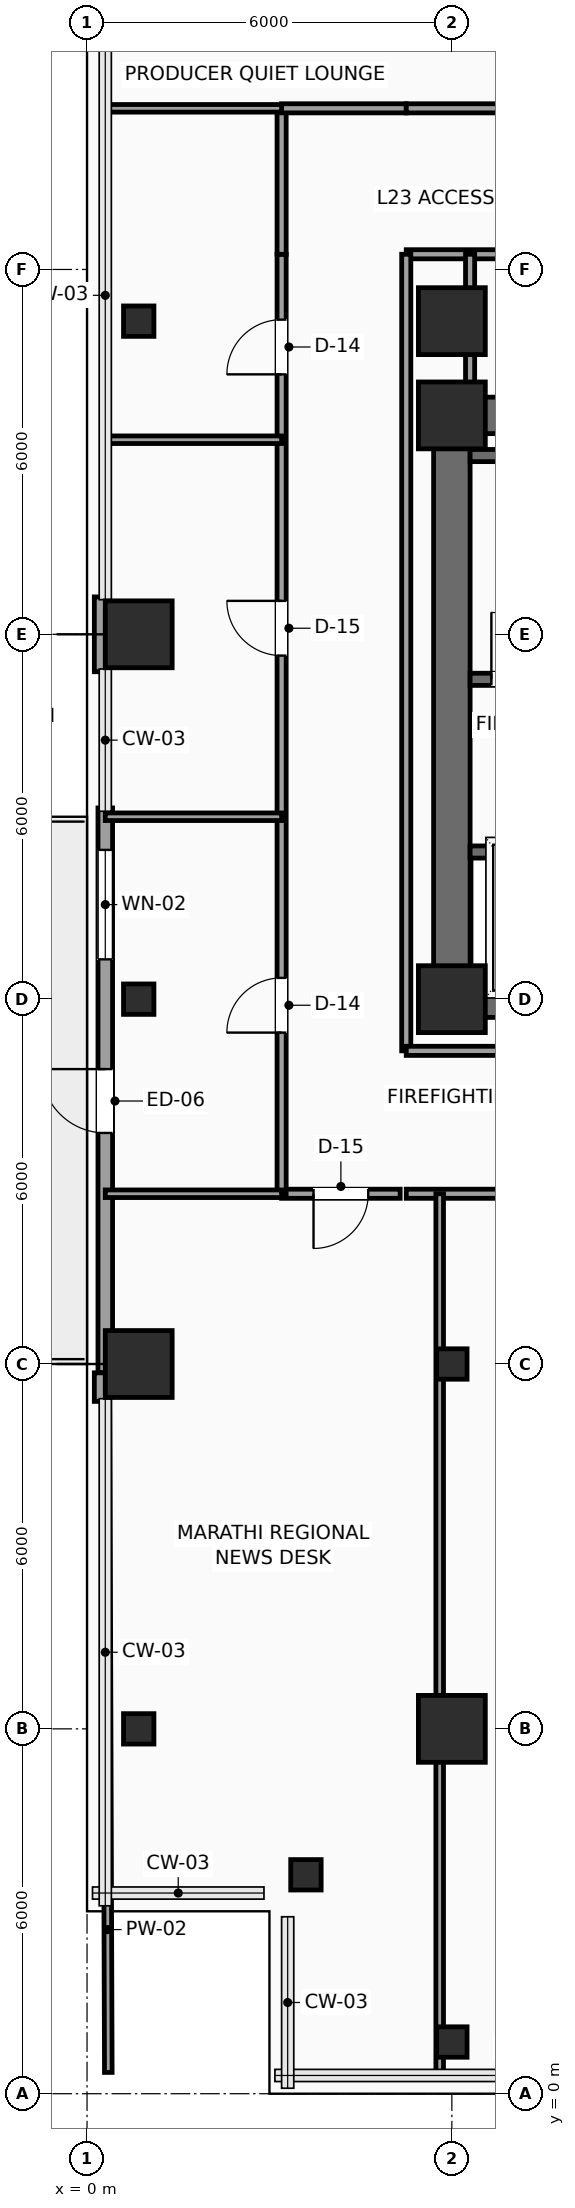
"""IFC4 building model, lengths in metres.
Left out: names, types, materials, properties, quantities, classifications, styles, units other than length and angle.
Written with IfcOpenShell. Run it as: python <this file> out.ifc"""

import sys

from ifc_helpers import new_model, si_unit, direction, frame, frame_2d, origin, origin_2d, place, context, subcontext, project, spatial, rectangle, hollow_rectangle, extrude, element, fill, save


model = new_model("IFC4")
c1 = context("Model", 3, precision=1e-05, world=origin(), true_north=direction((0.0, 1.0)))
c2 = subcontext(c1, "Body", "Model", "MODEL_VIEW")
j1 = project(units=[si_unit("LENGTHUNIT", "METRE"), si_unit("PLANEANGLEUNIT", "RADIAN")], contexts=[c1])
p1 = place(None, origin())
s1 = spatial("IfcSite", under=j1, at=p1, CompositionType="ELEMENT")
p2 = place(p1, origin())
s2 = spatial("IfcBuilding", under=s1, at=p2, CompositionType="ELEMENT")
p3 = place(p2, frame((0.0, 0.0, 99.6)))
s3 = spatial("IfcBuildingStorey", under=s2, at=p3, CompositionType="ELEMENT", Elevation=99.6)
for number, where, z_axis, x_axis in (
    (1, (6.0, 18.0, 0.0), (0.0, 0.0, 1.0), (1.0, 0.0, 0.0)),
    (2, (6.0, 27.6, 0.0), (0.0, 0.0, 1.0), (1.0, 0.0, 0.0)),
):
    element("IfcColumn", number, at=place(p3, frame(where, z_axis=z_axis, x_axis=x_axis)), inside=s3, PredefinedType="COLUMN", context=c2, shape_type="SweptSolid", body=[
        extrude(rectangle(XDim=1.1, YDim=1.1, at=origin_2d()), origin(), (0.0, 0.0, 1.0), 3.75),
    ])
for number, where, z_axis, x_axis in (
    (3, (3.6, 3.6, 0.0), (0.0, 0.0, 1.0), (1.0, 0.0, 0.0)),
    (4, (0.85, 6.0, 0.0), (0.0, 0.0, 1.0), (1.0, 0.0, 0.0)),
):
    element("IfcColumn", number, at=place(p3, frame(where, z_axis=z_axis, x_axis=x_axis)), inside=s3, PredefinedType="COLUMN", context=c2, shape_type="SweptSolid", body=[
        extrude(hollow_rectangle(XDim=0.5, YDim=0.5, WallThickness=0.025, InnerFilletRadius=0.025, OuterFilletRadius=0.04, at=origin_2d()), origin(), (0.0, 0.0, 1.0), 3.75),
    ])
p4 = place(p3, frame((0.85, 12.0, 0.0), z_axis=(0.0, 0.0, 1.0), x_axis=(1.0, 0.0, 0.0)))
e5 = element("IfcColumn", 5, at=p4, inside=s3, PredefinedType="COLUMN", context=c2, shape_type="SweptSolid", body=[
    extrude(rectangle(XDim=1.1, YDim=1.1, at=origin_2d()), origin(), (0.0, 0.0, 1.0), 3.75),
])
p5 = place(p3, frame((0.85, 18.0, 0.0), z_axis=(0.0, 0.0, 1.0), x_axis=(1.0, 0.0, 0.0)))
e6 = element("IfcColumn", 6, at=p5, inside=s3, PredefinedType="COLUMN", context=c2, shape_type="SweptSolid", body=[
    extrude(hollow_rectangle(XDim=0.5, YDim=0.5, WallThickness=0.025, InnerFilletRadius=0.025, OuterFilletRadius=0.04, at=origin_2d()), origin(), (0.0, 0.0, 1.0), 3.75),
])
p6 = place(p3, frame((0.85, 24.0, 0.0), z_axis=(0.0, 0.0, 1.0), x_axis=(1.0, 0.0, 0.0)))
e7 = element("IfcColumn", 7, at=p6, inside=s3, PredefinedType="COLUMN", context=c2, shape_type="SweptSolid", body=[
    extrude(rectangle(XDim=1.1, YDim=1.1, at=origin_2d()), origin(), (0.0, 0.0, 1.0), 3.75),
])
for number, where, z_axis, x_axis in (
    (8, (0.85, 29.15, 0.0), (0.0, 0.0, 1.0), (1.0, 0.0, 0.0)),
    (9, (6.0, 0.85, 0.0), (0.0, 0.0, 1.0), (1.0, 0.0, 0.0)),
):
    element("IfcColumn", number, at=place(p3, frame(where, z_axis=z_axis, x_axis=x_axis)), inside=s3, PredefinedType="COLUMN", context=c2, shape_type="SweptSolid", body=[
        extrude(hollow_rectangle(XDim=0.5, YDim=0.5, WallThickness=0.025, InnerFilletRadius=0.025, OuterFilletRadius=0.04, at=origin_2d()), origin(), (0.0, 0.0, 1.0), 3.75),
    ])
p7 = place(p3, frame((6.0, 6.0, 0.0), z_axis=(0.0, 0.0, 1.0), x_axis=(1.0, 0.0, 0.0)))
e10 = element("IfcColumn", 10, at=p7, inside=s3, PredefinedType="COLUMN", context=c2, shape_type="SweptSolid", body=[
    extrude(rectangle(XDim=1.1, YDim=1.1, at=origin_2d()), origin(), (0.0, 0.0, 1.0), 3.75),
])
p8 = place(p3, frame((6.0, 12.0, 0.0), z_axis=(0.0, 0.0, 1.0), x_axis=(1.0, 0.0, 0.0)))
e11 = element("IfcColumn", 11, at=p8, inside=s3, PredefinedType="COLUMN", context=c2, shape_type="SweptSolid", body=[
    extrude(hollow_rectangle(XDim=0.5, YDim=0.5, WallThickness=0.025, InnerFilletRadius=0.025, OuterFilletRadius=0.04, at=origin_2d()), origin(), (0.0, 0.0, 1.0), 3.75),
])
p9 = place(p3, frame((6.0, 29.15, 0.0), z_axis=(0.0, 0.0, 1.0), x_axis=(1.0, 0.0, 0.0)))
e12 = element("IfcColumn", 12, at=p9, inside=s3, PredefinedType="COLUMN", context=c2, shape_type="SweptSolid", body=[
    extrude(rectangle(XDim=1.1, YDim=1.1, at=origin_2d()), origin(), (0.0, 0.0, 1.0), 3.75),
])
p10 = place(p3, frame((0.3, 11.855, 0.0), z_axis=(0.0, 0.0, 1.0), x_axis=(0.0, 1.0, 0.0)))
e13 = element("IfcWall", 13, at=p10, inside=s3, PredefinedType="SOLIDWALL", context=c2, shape_type="SweptSolid", body=[
    extrude(rectangle(XDim=9.29, YDim=0.24, at=frame_2d((4.645, 0.0))), origin(), (0.0, 0.0, 1.0), 3.525),
])
p11 = place(p10, frame((3.945, 0.0, 0.0)))
e14 = element("IfcOpeningElement", 14, at=p11, cuts=e13, PredefinedType="OPENING", context=c2, shape_type="SweptSolid", body=[
    extrude(rectangle(XDim=1.05, YDim=2.2, at=frame_2d((0.525, 1.1))), frame((0.0, 0.13, 0.0), z_axis=(0.0, -1.0, 0.0), x_axis=(1.0, 0.0, 0.0)), (0.0, 0.0, 1.0), 0.26),
])
p12 = place(p10, frame((6.8, 0.0, 0.85)))
e15 = element("IfcOpeningElement", 15, at=p12, cuts=e13, PredefinedType="OPENING", context=c2, shape_type="SweptSolid", body=[
    extrude(rectangle(XDim=1.8, YDim=2.1, at=frame_2d((0.9, 1.05))), frame((0.0, 0.13, 0.0), z_axis=(0.0, -1.0, 0.0), x_axis=(1.0, 0.0, 0.0)), (0.0, 0.0, 1.0), 0.26),
])
p13 = place(p3, frame((0.24, 11.385, 0.0), z_axis=(0.0, 0.0, 1.0), x_axis=(0.0, 1.0, 0.0)))
e16 = element("IfcWall", 16, at=p13, inside=s3, PredefinedType="SOLIDWALL", context=c2, shape_type="SweptSolid", body=[
    extrude(rectangle(XDim=0.47, YDim=0.24, at=frame_2d((0.235, 0.0))), origin(), (0.0, 0.0, 1.0), 3.525),
])
p14 = place(p3, frame((0.24, 23.385, 0.0), z_axis=(0.0, 0.0, 1.0), x_axis=(0.0, 1.0, 0.0)))
e17 = element("IfcWall", 17, at=p14, inside=s3, PredefinedType="SOLIDWALL", context=c2, shape_type="SweptSolid", body=[
    extrude(rectangle(XDim=1.23, YDim=0.24, at=frame_2d((0.615, 0.0))), origin(), (0.0, 0.0, 1.0), 3.525),
])
p15 = place(p3, frame((6.0, 18.0, 0.0), z_axis=(0.0, 0.0, 1.0), x_axis=(1.0, 0.0, 0.0)))
e18 = element("IfcWall", 18, at=p15, inside=s3, PredefinedType="SHEAR", context=c2, shape_type="SweptSolid", body=[
    extrude(rectangle(XDim=12.0, YDim=0.6, at=frame_2d((6.0, 0.0))), origin(), (0.0, 0.0, 1.0), 3.525),
])
p16 = place(p15, frame((7.15, 0.0, 0.0)))
e19 = element("IfcOpeningElement", 19, at=p16, cuts=e18, PredefinedType="OPENING", context=c2, shape_type="SweptSolid", body=[
    extrude(rectangle(XDim=1.6, YDim=2.3, at=frame_2d((0.8, 1.15))), frame((0.0, 0.31, 0.0), z_axis=(0.0, -1.0, 0.0), x_axis=(1.0, 0.0, 0.0)), (0.0, 0.0, 1.0), 0.62),
])
p17 = place(p3, frame((6.0, 27.6, 0.0), z_axis=(0.0, 0.0, 1.0), x_axis=(1.0, 0.0, 0.0)))
e20 = element("IfcWall", 20, at=p17, inside=s3, PredefinedType="SHEAR", context=c2, shape_type="SweptSolid", body=[
    extrude(rectangle(XDim=12.0, YDim=0.6, at=frame_2d((6.0, 0.0))), origin(), (0.0, 0.0, 1.0), 3.525),
])
p18 = place(p17, frame((10.2, 0.0, 0.0)))
e21 = element("IfcOpeningElement", 21, at=p18, cuts=e20, PredefinedType="OPENING", context=c2, shape_type="SweptSolid", body=[
    extrude(rectangle(XDim=0.9, YDim=2.15, at=frame_2d((0.45, 1.075))), frame((0.0, 0.31, 0.0), z_axis=(0.0, -1.0, 0.0), x_axis=(1.0, 0.0, 0.0)), (0.0, 0.0, 1.0), 0.62),
])
p19 = place(p3, frame((6.0, 18.0, 0.0), z_axis=(0.0, 0.0, 1.0), x_axis=(0.0, 1.0, 0.0)))
e22 = element("IfcWall", 22, at=p19, inside=s3, PredefinedType="SHEAR", context=c2, shape_type="SweptSolid", body=[
    extrude(rectangle(XDim=9.6, YDim=0.6, at=frame_2d((4.8, 0.0))), origin(), (0.0, 0.0, 1.0), 3.525),
])
p20 = place(p3, frame((6.3, 23.26, 0.0), z_axis=(0.0, 0.0, 1.0), x_axis=(1.0, 0.0, 0.0)))
e23 = element("IfcWall", 23, at=p20, inside=s3, PredefinedType="SHEAR", context=c2, shape_type="SweptSolid", body=[
    extrude(rectangle(XDim=8.88, YDim=0.2, at=frame_2d((4.44, 0.0))), origin(), (0.0, 0.0, 1.0), 3.525),
])
p21 = place(p20, frame((0.35, 0.0, 0.0)))
e24 = element("IfcOpeningElement", 24, at=p21, cuts=e23, PredefinedType="OPENING", context=c2, shape_type="SweptSolid", body=[
    extrude(rectangle(XDim=1.1, YDim=2.2, at=frame_2d((0.55, 1.1))), frame((0.0, 0.11, 0.0), z_axis=(0.0, -1.0, 0.0), x_axis=(1.0, 0.0, 0.0)), (0.0, 0.0, 1.0), 0.22),
])
p22 = place(p3, frame((6.3, 26.94, 0.0), z_axis=(0.0, 0.0, 1.0), x_axis=(1.0, 0.0, 0.0)))
e25 = element("IfcWall", 25, at=p22, inside=s3, PredefinedType="SHEAR", context=c2, shape_type="SweptSolid", body=[
    extrude(rectangle(XDim=8.88, YDim=0.2, at=frame_2d((4.44, 0.0))), origin(), (0.0, 0.0, 1.0), 3.525),
])
p23 = place(p3, frame((6.3, 20.42, 0.0), z_axis=(0.0, 0.0, 1.0), x_axis=(1.0, 0.0, 0.0)))
e26 = element("IfcWall", 26, at=p23, inside=s3, PredefinedType="SHEAR", context=c2, shape_type="SweptSolid", body=[
    extrude(rectangle(XDim=4.95, YDim=0.2, at=frame_2d((2.475, 0.0))), origin(), (0.0, 0.0, 1.0), 3.525),
])
p24 = place(p23, frame((0.65, 0.0, 0.0)))
e27 = element("IfcOpeningElement", 27, at=p24, cuts=e26, PredefinedType="OPENING", context=c2, shape_type="SweptSolid", body=[
    extrude(rectangle(XDim=1.1, YDim=2.2, at=frame_2d((0.55, 1.1))), frame((0.0, 0.11, 0.0), z_axis=(0.0, -1.0, 0.0), x_axis=(1.0, 0.0, 0.0)), (0.0, 0.0, 1.0), 0.22),
])
p25 = place(p23, frame((3.05, 0.0, 0.0)))
e28 = element("IfcOpeningElement", 28, at=p25, cuts=e26, PredefinedType="OPENING", context=c2, shape_type="SweptSolid", body=[
    extrude(rectangle(XDim=1.1, YDim=2.2, at=frame_2d((0.55, 1.1))), frame((0.0, 0.11, 0.0), z_axis=(0.0, -1.0, 0.0), x_axis=(1.0, 0.0, 0.0)), (0.0, 0.0, 1.0), 0.22),
])
p26 = place(p3, frame((12.4, 14.8, 0.0), z_axis=(0.0, 0.0, 1.0), x_axis=(-1.0, 0.0, 0.0)))
e29 = element("IfcWall", 29, at=p26, inside=s3, PredefinedType="PARTITIONING", context=c2, shape_type="SweptSolid", body=[
    extrude(rectangle(XDim=7.15, YDim=0.15, at=frame_2d((3.575, 0.0))), origin(), (0.0, 0.0, 1.0), 3.067),
])
p27 = place(p26, frame((3.15, 0.0, 0.0)))
e30 = element("IfcOpeningElement", 30, at=p27, cuts=e29, PredefinedType="OPENING", context=c2, shape_type="SweptSolid", body=[
    extrude(rectangle(XDim=0.9, YDim=2.1, at=frame_2d((0.45, 1.05))), frame((0.0, 0.085, 0.0), z_axis=(0.0, -1.0, 0.0), x_axis=(1.0, 0.0, 0.0)), (0.0, 0.0, 1.0), 0.17),
])
p28 = place(p3, frame((5.15, 14.8, 0.0), z_axis=(0.0, 0.0, 1.0), x_axis=(-1.0, 0.0, 0.0)))
e31 = element("IfcWall", 31, at=p28, inside=s3, PredefinedType="PARTITIONING", context=c2, shape_type="SweptSolid", body=[
    extrude(rectangle(XDim=1.95, YDim=0.15, at=frame_2d((0.975, 0.0))), origin(), (0.0, 0.0, 1.0), 3.067),
])
p29 = place(p28, frame((0.525, 0.0, 0.0)))
e32 = element("IfcOpeningElement", 32, at=p29, cuts=e31, PredefinedType="OPENING", context=c2, shape_type="SweptSolid", body=[
    extrude(rectangle(XDim=0.9, YDim=2.1, at=frame_2d((0.45, 1.05))), frame((0.0, 0.085, 0.0), z_axis=(0.0, -1.0, 0.0), x_axis=(1.0, 0.0, 0.0)), (0.0, 0.0, 1.0), 0.17),
])
p30 = place(p3, frame((3.2, 14.8, 0.0), z_axis=(0.0, 0.0, 1.0), x_axis=(0.0, 1.0, 0.0)))
e33 = element("IfcWall", 33, at=p30, inside=s3, PredefinedType="PARTITIONING", context=c2, shape_type="SweptSolid", body=[
    extrude(rectangle(XDim=15.45, YDim=0.15, at=frame_2d((7.725, 0.0))), origin(), (0.0, 0.0, 1.0), 3.525),
])
p31 = place(p30, frame((2.65, 0.0, 0.0)))
e34 = element("IfcOpeningElement", 34, at=p31, cuts=e33, PredefinedType="OPENING", context=c2, shape_type="SweptSolid", body=[
    extrude(rectangle(XDim=0.9, YDim=2.1, at=frame_2d((0.45, 1.05))), frame((0.0, 0.085, 0.0), z_axis=(0.0, -1.0, 0.0), x_axis=(1.0, 0.0, 0.0)), (0.0, 0.0, 1.0), 0.17),
])
p32 = place(p30, frame((8.85, 0.0, 0.0)))
e35 = element("IfcOpeningElement", 35, at=p32, cuts=e33, PredefinedType="OPENING", context=c2, shape_type="SweptSolid", body=[
    extrude(rectangle(XDim=0.9, YDim=2.1, at=frame_2d((0.45, 1.05))), frame((0.0, 0.085, 0.0), z_axis=(0.0, -1.0, 0.0), x_axis=(1.0, 0.0, 0.0)), (0.0, 0.0, 1.0), 0.17),
])
p33 = place(p30, frame((13.475, 0.0, 0.0)))
e36 = element("IfcOpeningElement", 36, at=p33, cuts=e33, PredefinedType="OPENING", context=c2, shape_type="SweptSolid", body=[
    extrude(rectangle(XDim=0.9, YDim=2.1, at=frame_2d((0.45, 1.05))), frame((0.0, 0.085, 0.0), z_axis=(0.0, -1.0, 0.0), x_axis=(1.0, 0.0, 0.0)), (0.0, 0.0, 1.0), 0.17),
])
p34 = place(p3, frame((3.2, 30.25, 0.0), z_axis=(0.0, 0.0, 1.0), x_axis=(0.0, 1.0, 0.0)))
e37 = element("IfcWall", 37, at=p34, inside=s3, PredefinedType="PARTITIONING", context=c2, shape_type="SweptSolid", body=[
    extrude(rectangle(XDim=2.4, YDim=0.15, at=frame_2d((1.2, 0.0))), origin(), (0.0, 0.0, 1.0), 3.525),
])
p35 = place(p3, frame((3.2, 32.65, 0.0), z_axis=(0.0, 0.0, 1.0), x_axis=(1.0, 0.0, 0.0)))
e38 = element("IfcWall", 38, at=p35, inside=s3, PredefinedType="PARTITIONING", context=c2, shape_type="SweptSolid", body=[
    extrude(rectangle(XDim=2.05, YDim=0.15, at=frame_2d((1.025, 0.0))), origin(), (0.0, 0.0, 1.0), 3.525),
])
p36 = place(p3, frame((5.25, 32.65, 0.0), z_axis=(0.0, 0.0, 1.0), x_axis=(1.0, 0.0, 0.0)))
e39 = element("IfcWall", 39, at=p36, inside=s3, PredefinedType="PARTITIONING", context=c2, shape_type="SweptSolid", body=[
    extrude(rectangle(XDim=8.55, YDim=0.15, at=frame_2d((4.275, 0.0))), origin(), (0.0, 0.0, 1.0), 3.525),
])
p37 = place(p3, frame((15.88, 30.25, 0.0), z_axis=(0.0, 0.0, 1.0), x_axis=(-1.0, 0.0, 0.0)))
e40 = element("IfcWall", 40, at=p37, inside=s3, PredefinedType="PARTITIONING", context=c2, shape_type="SweptSolid", body=[
    extrude(rectangle(XDim=10.63, YDim=0.15, at=frame_2d((5.315, 0.0))), origin(), (0.0, 0.0, 1.0), 3.525),
])
p38 = place(p37, frame((6.13, 0.0, 0.0)))
e41 = element("IfcOpeningElement", 41, at=p38, cuts=e40, PredefinedType="OPENING", context=c2, shape_type="SweptSolid", body=[
    extrude(rectangle(XDim=0.9, YDim=2.1, at=frame_2d((0.45, 1.05))), frame((0.0, 0.085, 0.0), z_axis=(0.0, -1.0, 0.0), x_axis=(1.0, 0.0, 0.0)), (0.0, 0.0, 1.0), 0.17),
])
p39 = place(p3, frame((5.25, 30.25, 0.0), z_axis=(0.0, 0.0, 1.0), x_axis=(0.0, -1.0, 0.0)))
e42 = element("IfcWall", 42, at=p39, inside=s3, PredefinedType="PARTITIONING", context=c2, shape_type="SweptSolid", body=[
    extrude(rectangle(XDim=13.1, YDim=0.15, at=frame_2d((6.55, 0.0))), origin(), (0.0, 0.0, 1.0), 3.525),
])
p40 = place(p3, frame((5.25, 17.15, 0.0), z_axis=(0.0, 0.0, 1.0), x_axis=(1.0, 0.0, 0.0)))
e43 = element("IfcWall", 43, at=p40, inside=s3, PredefinedType="PARTITIONING", context=c2, shape_type="SweptSolid", body=[
    extrude(rectangle(XDim=7.15, YDim=0.15, at=frame_2d((3.575, 0.0))), origin(), (0.0, 0.0, 1.0), 3.525),
])
p41 = place(p3, frame((6.3, 27.68, 0.0), z_axis=(0.0, 0.0, 1.0), x_axis=(0.0, 1.0, 0.0)))
e44 = element("IfcWall", 44, at=p41, inside=s3, PredefinedType="PARTITIONING", context=c2, shape_type="SweptSolid", body=[
    extrude(rectangle(XDim=2.57, YDim=0.15, at=frame_2d((1.285, 0.0))), origin(), (0.0, 0.0, 1.0), 3.017),
])
p42 = place(p3, frame((0.35, 0.35, 0.0), z_axis=(0.0, 0.0, 1.0), x_axis=(-0.003473507221, 0.999993967356, 0.0)))
e45 = element("IfcWall", 45, at=p42, inside=s3, PredefinedType="PARTITIONING", context=c2, shape_type="SweptSolid", body=[
    extrude(rectangle(XDim=11.035, YDim=0.125, at=frame_2d((5.518, 0.0))), origin(), (0.0, 0.0, 1.0), 3.525),
])
p43 = place(p3, frame((5.8, 0.3, 0.0), z_axis=(0.0, 0.0, 1.0), x_axis=(0.0, 1.0, 0.0)))
e46 = element("IfcWall", 46, at=p43, inside=s3, PredefinedType="PARTITIONING", context=c2, shape_type="SweptSolid", body=[
    extrude(rectangle(XDim=14.5, YDim=0.125, at=frame_2d((7.25, 0.0))), origin(), (0.0, 0.0, 1.0), 3.017),
])
for number, where, z_axis, x_axis in (
    (47, (0.3, 14.8, 0.0), (0.0, 0.0, 1.0), (1.0, 0.0, 0.0)),
    (48, (0.3, 21.0, 0.0), (0.0, 0.0, 1.0), (1.0, 0.0, 0.0)),
):
    element("IfcWall", number, at=place(p3, frame(where, z_axis=z_axis, x_axis=x_axis)), inside=s3, PredefinedType="PARTITIONING", context=c2, shape_type="SweptSolid", body=[
        extrude(rectangle(XDim=2.9, YDim=0.125, at=frame_2d((1.45, 0.0))), origin(), (0.0, 0.0, 1.0), 3.067),
    ])
for number, where, z_axis, x_axis in (
    (49, (0.3, 27.2, 0.0), (0.0, 0.0, 1.0), (1.0, 0.0, 0.0)),
    (50, (0.3, 32.65, 0.0), (0.0, 0.0, 1.0), (1.0, 0.0, 0.0)),
):
    element("IfcWall", number, at=place(p3, frame(where, z_axis=z_axis, x_axis=x_axis)), inside=s3, PredefinedType="PARTITIONING", context=c2, shape_type="SweptSolid", body=[
        extrude(rectangle(XDim=2.9, YDim=0.125, at=frame_2d((1.45, 0.0))), origin(), (0.0, 0.0, 1.0), 3.525),
    ])
p44 = place(p11, origin())
e51 = element("IfcDoor", 51, at=p44, inside=s3, OperationType="SINGLE_SWING_RIGHT", PredefinedType="DOOR", context=c2, shape_type="SweptSolid", body=[
    extrude(rectangle(XDim=1.05, YDim=2.2, at=frame_2d((0.525, 1.1))), frame((0.0, 0.025, 0.0), z_axis=(0.0, -1.0, 0.0), x_axis=(1.0, 0.0, 0.0)), (0.0, 0.0, 1.0), 0.05),
])
fill(e14, e51)
p45 = place(p12, origin())
e52 = element("IfcWindow", 52, at=p45, inside=s3, PartitioningType="SINGLE_PANEL", PredefinedType="WINDOW", context=c2, shape_type="SweptSolid", body=[
    extrude(rectangle(XDim=1.8, YDim=2.1, at=frame_2d((0.9, 1.05))), frame((0.0, 0.03, 0.0), z_axis=(0.0, -1.0, 0.0), x_axis=(1.0, 0.0, 0.0)), (0.0, 0.0, 1.0), 0.06),
])
fill(e15, e52)
p46 = place(p21, origin())
e53 = element("IfcDoor", 53, at=p46, inside=s3, OperationType="SINGLE_SWING_LEFT", PredefinedType="DOOR", context=c2, shape_type="SweptSolid", body=[
    extrude(rectangle(XDim=1.1, YDim=2.2, at=frame_2d((0.55, 1.1))), frame((0.0, 0.025, 0.0), z_axis=(0.0, -1.0, 0.0), x_axis=(1.0, 0.0, 0.0)), (0.0, 0.0, 1.0), 0.05),
])
fill(e24, e53)
p47 = place(p29, origin())
e54 = element("IfcDoor", 54, at=p47, inside=s3, OperationType="SINGLE_SWING_RIGHT", PredefinedType="DOOR", context=c2, shape_type="SweptSolid", body=[
    extrude(rectangle(XDim=0.9, YDim=2.1, at=frame_2d((0.45, 1.05))), frame((0.0, 0.025, 0.0), z_axis=(0.0, -1.0, 0.0), x_axis=(1.0, 0.0, 0.0)), (0.0, 0.0, 1.0), 0.05),
])
fill(e32, e54)
p48 = place(p31, origin())
e55 = element("IfcDoor", 55, at=p48, inside=s3, OperationType="SINGLE_SWING_LEFT", PredefinedType="DOOR", context=c2, shape_type="SweptSolid", body=[
    extrude(rectangle(XDim=0.9, YDim=2.1, at=frame_2d((0.45, 1.05))), frame((0.0, 0.025, 0.0), z_axis=(0.0, -1.0, 0.0), x_axis=(1.0, 0.0, 0.0)), (0.0, 0.0, 1.0), 0.05),
])
fill(e34, e55)
p49 = place(p32, origin())
e56 = element("IfcDoor", 56, at=p49, inside=s3, OperationType="SINGLE_SWING_RIGHT", PredefinedType="DOOR", context=c2, shape_type="SweptSolid", body=[
    extrude(rectangle(XDim=0.9, YDim=2.1, at=frame_2d((0.45, 1.05))), frame((0.0, 0.025, 0.0), z_axis=(0.0, -1.0, 0.0), x_axis=(1.0, 0.0, 0.0)), (0.0, 0.0, 1.0), 0.05),
])
fill(e35, e56)
p50 = place(p33, origin())
e57 = element("IfcDoor", 57, at=p50, inside=s3, OperationType="SINGLE_SWING_LEFT", PredefinedType="DOOR", context=c2, shape_type="SweptSolid", body=[
    extrude(rectangle(XDim=0.9, YDim=2.1, at=frame_2d((0.45, 1.05))), frame((0.0, 0.025, 0.0), z_axis=(0.0, -1.0, 0.0), x_axis=(1.0, 0.0, 0.0)), (0.0, 0.0, 1.0), 0.05),
])
fill(e36, e57)
save(model, sys.argv[1])
